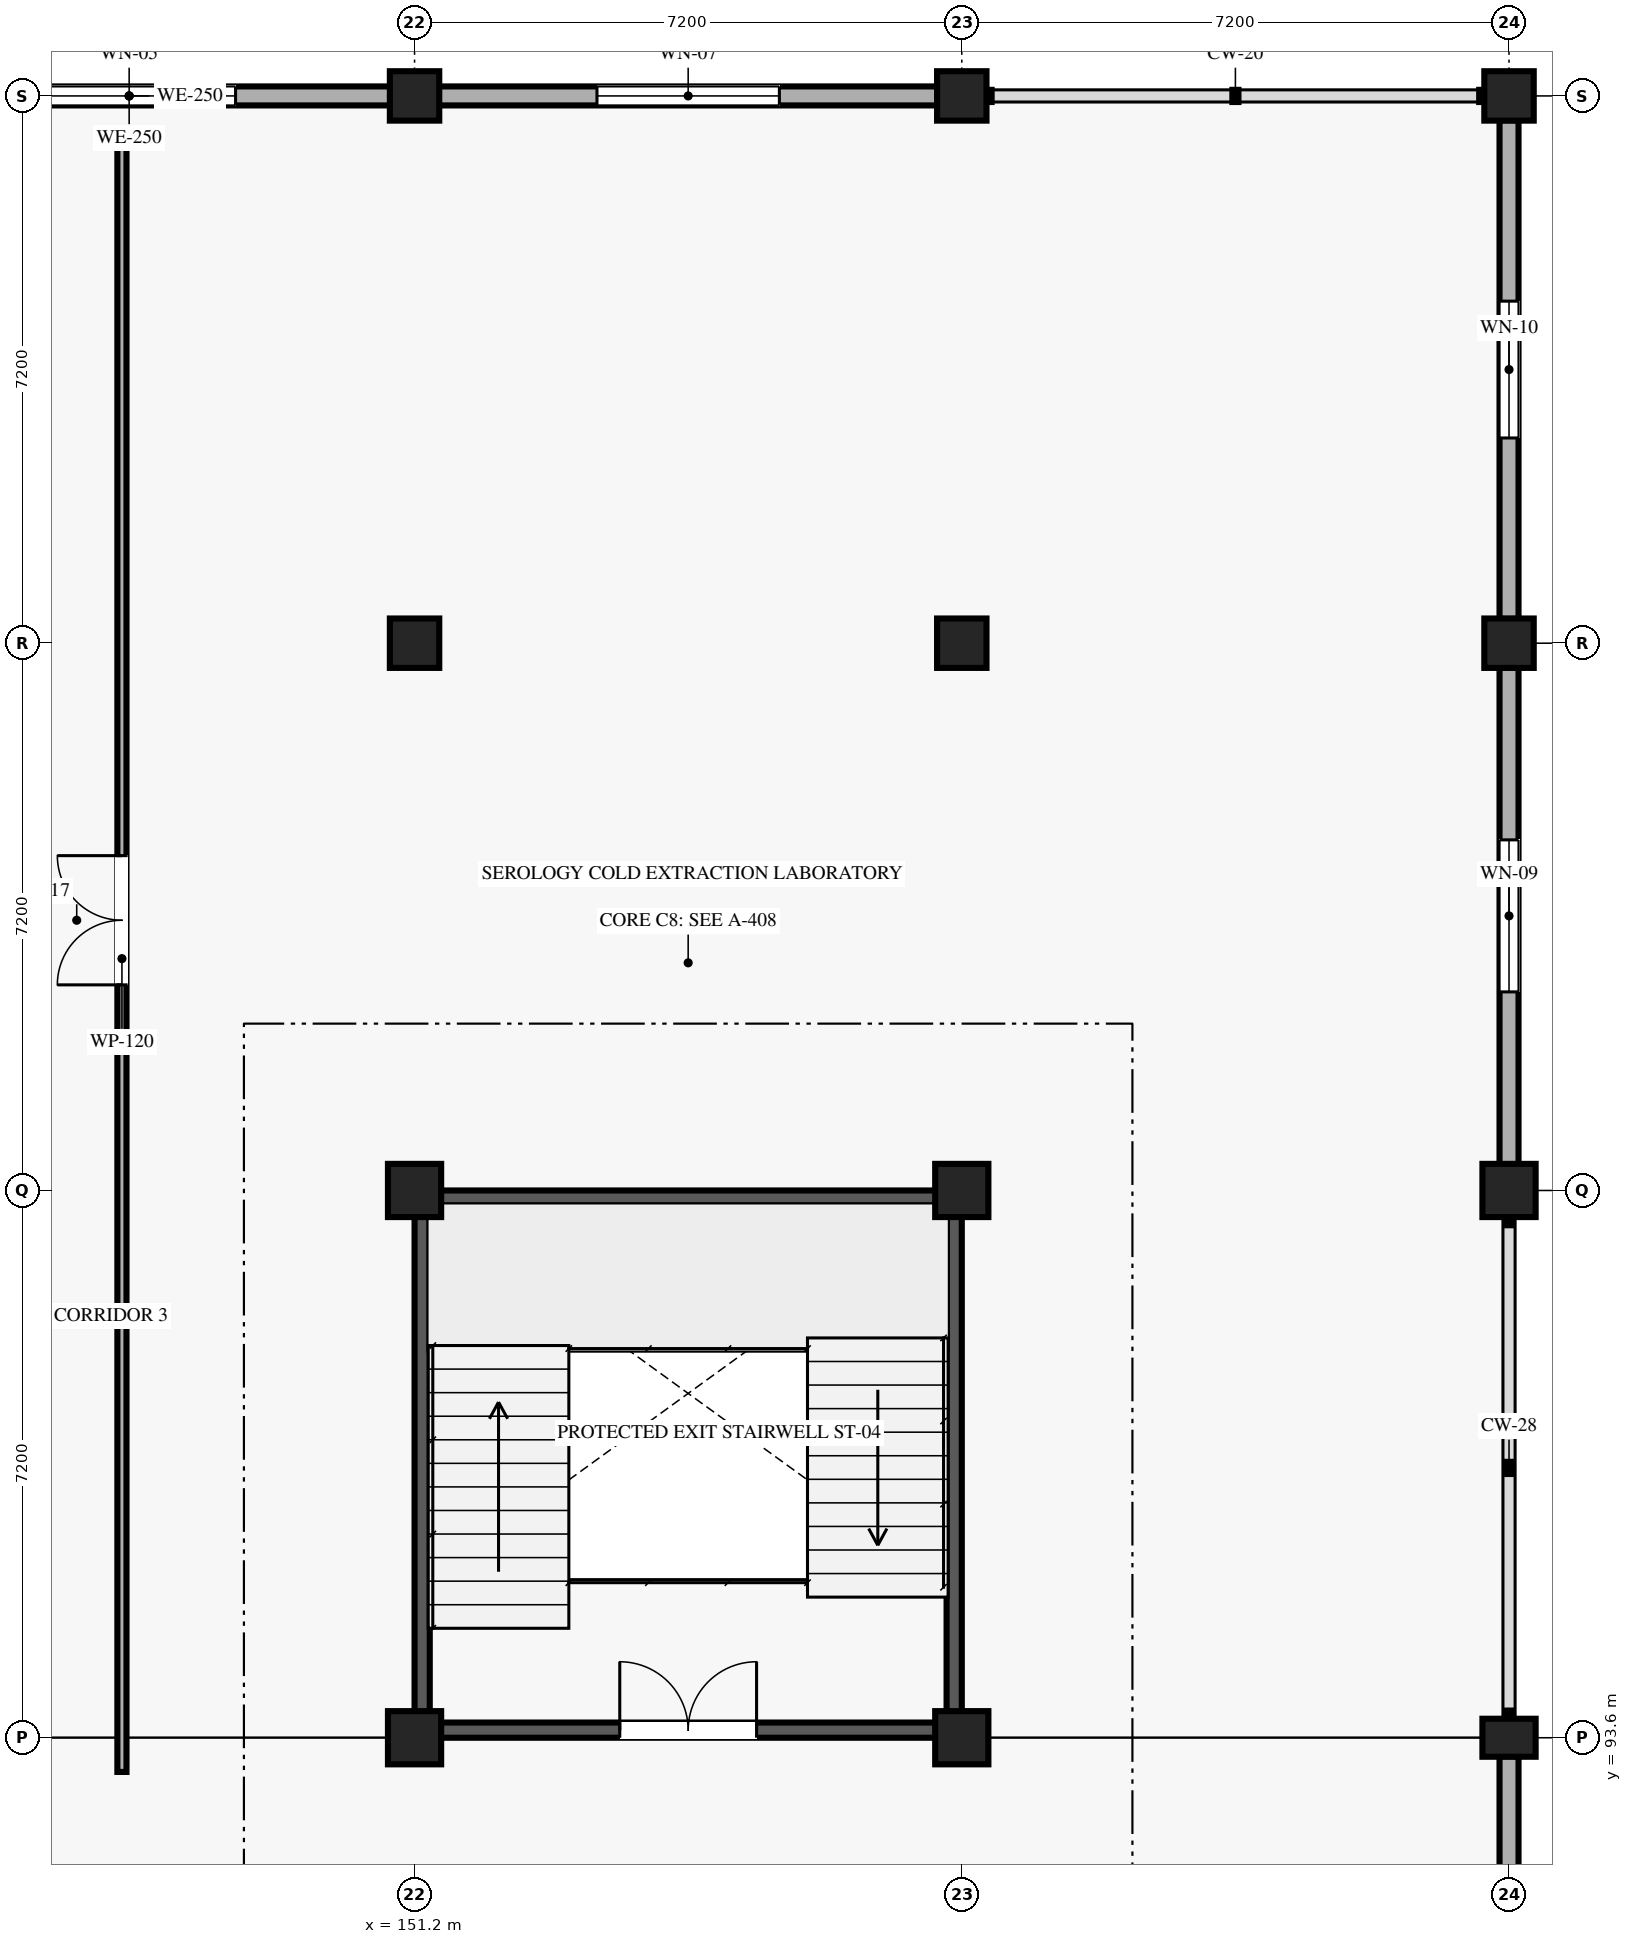
"""IFC4 building model, lengths in metres.
Left out: names, types, materials, properties, quantities, classifications, styles, units other than length and angle.
Written with IfcOpenShell. Run it as: python <this file> out.ifc"""

import sys

from ifc_helpers import new_model, si_unit, direction, frame, frame_2d, origin, origin_2d, place, context, subcontext, project, spatial, rectangle, extrude, element, fill, save


model = new_model("IFC4")
c1 = context("Model", 3, precision=1e-05, world=origin(), true_north=direction((0.0, 1.0)))
c2 = subcontext(c1, "Body", "Model", "MODEL_VIEW")
j1 = project(units=[si_unit("LENGTHUNIT", "METRE"), si_unit("PLANEANGLEUNIT", "RADIAN")], contexts=[c1])
p1 = place(None, origin())
s1 = spatial("IfcSite", under=j1, at=p1, CompositionType="ELEMENT")
p2 = place(p1, origin())
s2 = spatial("IfcBuilding", under=s1, at=p2, CompositionType="ELEMENT")
p3 = place(p2, frame((0.0, 0.0, 13.5)))
s3 = spatial("IfcBuildingStorey", under=s2, at=p3, CompositionType="ELEMENT", Elevation=13.5)
for number, where, z_axis, x_axis in (
    (1, (151.2, 93.6, 0.0), (0.0, 0.0, 1.0), (1.0, 0.0, 0.0)),
    (2, (151.2, 100.8, 0.0), (0.0, 0.0, 1.0), (1.0, 0.0, 0.0)),
):
    element("IfcColumn", number, at=place(p3, frame(where, z_axis=z_axis, x_axis=x_axis)), inside=s3, PredefinedType="COLUMN", context=c2, shape_type="SweptSolid", body=[
        extrude(rectangle(XDim=0.7, YDim=0.7, at=origin_2d()), origin(), (0.0, 0.0, 1.0), 4.05),
    ])
for number, where, z_axis, x_axis in (
    (3, (151.2, 108.0, 0.0), (0.0, 0.0, 1.0), (1.0, 0.0, 0.0)),
    (4, (151.2, 115.2, 0.0), (0.0, 0.0, 1.0), (1.0, 0.0, 0.0)),
):
    element("IfcColumn", number, at=place(p3, frame(where, z_axis=z_axis, x_axis=x_axis)), inside=s3, PredefinedType="COLUMN", context=c2, shape_type="SweptSolid", body=[
        extrude(rectangle(XDim=0.65, YDim=0.65, at=origin_2d()), origin(), (0.0, 0.0, 1.0), 4.05),
    ])
for number, where, z_axis, x_axis in (
    (5, (158.4, 93.6, 0.0), (0.0, 0.0, 1.0), (1.0, 0.0, 0.0)),
    (6, (158.4, 100.8, 0.0), (0.0, 0.0, 1.0), (1.0, 0.0, 0.0)),
):
    element("IfcColumn", number, at=place(p3, frame(where, z_axis=z_axis, x_axis=x_axis)), inside=s3, PredefinedType="COLUMN", context=c2, shape_type="SweptSolid", body=[
        extrude(rectangle(XDim=0.7, YDim=0.7, at=origin_2d()), origin(), (0.0, 0.0, 1.0), 4.05),
    ])
for number, where, z_axis, x_axis in (
    (7, (158.4, 108.0, 0.0), (0.0, 0.0, 1.0), (1.0, 0.0, 0.0)),
    (8, (158.4, 115.2, 0.0), (0.0, 0.0, 1.0), (1.0, 0.0, 0.0)),
):
    element("IfcColumn", number, at=place(p3, frame(where, z_axis=z_axis, x_axis=x_axis)), inside=s3, PredefinedType="COLUMN", context=c2, shape_type="SweptSolid", body=[
        extrude(rectangle(XDim=0.65, YDim=0.65, at=origin_2d()), origin(), (0.0, 0.0, 1.0), 4.05),
    ])
p4 = place(p3, frame((165.6, 93.6, 0.0), z_axis=(0.0, 0.0, 1.0), x_axis=(0.0, 1.0, 0.0)))
e9 = element("IfcColumn", 9, at=p4, inside=s3, PredefinedType="COLUMN", context=c2, shape_type="SweptSolid", body=[
    extrude(rectangle(XDim=0.5, YDim=0.7, at=origin_2d()), origin(), (0.0, 0.0, 1.0), 4.05),
])
p5 = place(p3, frame((165.6, 100.8, 0.0), z_axis=(0.0, 0.0, 1.0), x_axis=(1.0, 0.0, 0.0)))
e10 = element("IfcColumn", 10, at=p5, inside=s3, PredefinedType="COLUMN", context=c2, shape_type="SweptSolid", body=[
    extrude(rectangle(XDim=0.7, YDim=0.7, at=origin_2d()), origin(), (0.0, 0.0, 1.0), 4.05),
])
for number, where, z_axis, x_axis in (
    (11, (165.6, 108.0, 0.0), (0.0, 0.0, 1.0), (1.0, 0.0, 0.0)),
    (12, (165.6, 115.2, 0.0), (0.0, 0.0, 1.0), (1.0, 0.0, 0.0)),
):
    element("IfcColumn", number, at=place(p3, frame(where, z_axis=z_axis, x_axis=x_axis)), inside=s3, PredefinedType="COLUMN", context=c2, shape_type="SweptSolid", body=[
        extrude(rectangle(XDim=0.65, YDim=0.65, at=origin_2d()), origin(), (0.0, 0.0, 1.0), 4.05),
    ])
p6 = place(p3, frame((144.01, 115.2, 0.0), z_axis=(0.0, 0.0, 1.0), x_axis=(1.0, 0.0, 0.0)))
e13 = element("IfcWall", 13, at=p6, inside=s3, PredefinedType="SOLIDWALL", context=c2, shape_type="SweptSolid", body=[
    extrude(rectangle(XDim=6.87, YDim=0.25, at=frame_2d((3.435, 0.0))), origin(), (0.0, 0.0, 1.0), 3.195),
])
p7 = place(p6, frame((2.035, 0.0, 0.85)))
e14 = element("IfcOpeningElement", 14, at=p7, cuts=e13, PredefinedType="OPENING", context=c2, shape_type="SweptSolid", body=[
    extrude(rectangle(XDim=2.8, YDim=1.85, at=frame_2d((1.4, 0.925))), frame((0.0, 0.135, 0.0), z_axis=(0.0, -1.0, 0.0), x_axis=(1.0, 0.0, 0.0)), (0.0, 0.0, 1.0), 0.27),
])
p8 = place(p3, frame((151.52, 115.2, 0.0), z_axis=(0.0, 0.0, 1.0), x_axis=(1.0, 0.0, 0.0)))
e15 = element("IfcWall", 15, at=p8, inside=s3, PredefinedType="SOLIDWALL", context=c2, shape_type="SweptSolid", body=[
    extrude(rectangle(XDim=6.56, YDim=0.25, at=frame_2d((3.28, 0.0))), origin(), (0.0, 0.0, 1.0), 3.195),
])
p9 = place(p8, frame((2.08, 0.0, 0.85)))
e16 = element("IfcOpeningElement", 16, at=p9, cuts=e15, PredefinedType="OPENING", context=c2, shape_type="SweptSolid", body=[
    extrude(rectangle(XDim=2.4, YDim=1.75, at=frame_2d((1.2, 0.875))), frame((0.0, 0.135, 0.0), z_axis=(0.0, -1.0, 0.0), x_axis=(1.0, 0.0, 0.0)), (0.0, 0.0, 1.0), 0.27),
])
p10 = place(p3, frame((165.6, 86.645, 0.0), z_axis=(0.0, 0.0, 1.0), x_axis=(0.0, 1.0, 0.0)))
e17 = element("IfcWall", 17, at=p10, inside=s3, PredefinedType="SOLIDWALL", context=c2, shape_type="SweptSolid", body=[
    extrude(rectangle(XDim=6.71, YDim=0.25, at=frame_2d((3.355, 0.0))), origin(), (0.0, 0.0, 1.0), 3.195),
])
p11 = place(p10, frame((2.155, 0.0, 0.85)))
e18 = element("IfcOpeningElement", 18, at=p11, cuts=e17, PredefinedType="OPENING", context=c2, shape_type="SweptSolid", body=[
    extrude(rectangle(XDim=2.4, YDim=1.75, at=frame_2d((1.2, 0.875))), frame((0.0, 0.135, 0.0), z_axis=(0.0, -1.0, 0.0), x_axis=(1.0, 0.0, 0.0)), (0.0, 0.0, 1.0), 0.27),
])
p12 = place(p3, frame((165.6, 101.145, 0.0), z_axis=(0.0, 0.0, 1.0), x_axis=(0.0, 1.0, 0.0)))
e19 = element("IfcWall", 19, at=p12, inside=s3, PredefinedType="SOLIDWALL", context=c2, shape_type="SweptSolid", body=[
    extrude(rectangle(XDim=6.535, YDim=0.25, at=frame_2d((3.268, 0.0))), origin(), (0.0, 0.0, 1.0), 3.195),
])
p13 = place(p12, frame((2.268, 0.0, 0.85)))
e20 = element("IfcOpeningElement", 20, at=p13, cuts=e19, PredefinedType="OPENING", context=c2, shape_type="SweptSolid", body=[
    extrude(rectangle(XDim=2.0, YDim=1.65, at=frame_2d((1.0, 0.825))), frame((0.0, 0.135, 0.0), z_axis=(0.0, -1.0, 0.0), x_axis=(1.0, 0.0, 0.0)), (0.0, 0.0, 1.0), 0.27),
])
p14 = place(p3, frame((165.6, 108.32, 0.0), z_axis=(0.0, 0.0, 1.0), x_axis=(0.0, 1.0, 0.0)))
e21 = element("IfcWall", 21, at=p14, inside=s3, PredefinedType="SOLIDWALL", context=c2, shape_type="SweptSolid", body=[
    extrude(rectangle(XDim=6.56, YDim=0.25, at=frame_2d((3.28, 0.0))), origin(), (0.0, 0.0, 1.0), 3.195),
])
p15 = place(p14, frame((2.38, 0.0, 0.85)))
e22 = element("IfcOpeningElement", 22, at=p15, cuts=e21, PredefinedType="OPENING", context=c2, shape_type="SweptSolid", body=[
    extrude(rectangle(XDim=1.8, YDim=1.6, at=frame_2d((0.9, 0.8))), frame((0.0, 0.135, 0.0), z_axis=(0.0, -1.0, 0.0), x_axis=(1.0, 0.0, 0.0)), (0.0, 0.0, 1.0), 0.27),
])
p16 = place(p3, frame((151.4, 93.7, 0.0), z_axis=(0.0, 0.0, 1.0), x_axis=(1.0, 0.0, 0.0)))
e23 = element("IfcWall", 23, at=p16, inside=s3, PredefinedType="SHEAR", context=c2, shape_type="SweptSolid", body=[
    extrude(rectangle(XDim=6.8, YDim=0.2, at=frame_2d((3.4, 0.0))), origin(), (0.0, 0.0, 1.0), 3.81),
])
p17 = place(p16, frame((2.5, 0.0, 0.0)))
e24 = element("IfcOpeningElement", 24, at=p17, cuts=e23, PredefinedType="OPENING", context=c2, shape_type="SweptSolid", body=[
    extrude(rectangle(XDim=1.8, YDim=2.2, at=frame_2d((0.9, 1.1))), frame((0.0, 0.11, 0.0), z_axis=(0.0, -1.0, 0.0), x_axis=(1.0, 0.0, 0.0)), (0.0, 0.0, 1.0), 0.22),
])
for number, where, z_axis, x_axis in (
    (25, (151.4, 100.7, 0.0), (0.0, 0.0, 1.0), (1.0, 0.0, 0.0)),
    (26, (151.3, 93.8, 0.0), (0.0, 0.0, 1.0), (0.0, 1.0, 0.0)),
    (27, (158.3, 93.8, 0.0), (0.0, 0.0, 1.0), (0.0, 1.0, 0.0)),
):
    element("IfcWall", number, at=place(p3, frame(where, z_axis=z_axis, x_axis=x_axis)), inside=s3, PredefinedType="SHEAR", context=c2, shape_type="SweptSolid", body=[
        extrude(rectangle(XDim=6.8, YDim=0.2, at=frame_2d((3.4, 0.0))), origin(), (0.0, 0.0, 1.0), 3.81),
    ])
p18 = place(p3, frame((147.35, 93.15, 0.0), z_axis=(0.0, 0.0, 1.0), x_axis=(0.0, 1.0, 0.0)))
e28 = element("IfcWall", 28, at=p18, inside=s3, PredefinedType="PARTITIONING", context=c2, shape_type="SweptSolid", body=[
    extrude(rectangle(XDim=21.4, YDim=0.12, at=frame_2d((10.7, 0.0))), origin(), (0.0, 0.0, 1.0), 3.81),
])
p19 = place(p18, frame((10.355, 0.0, 0.0)))
e29 = element("IfcOpeningElement", 29, at=p19, cuts=e28, PredefinedType="OPENING", context=c2, shape_type="SweptSolid", body=[
    extrude(rectangle(XDim=1.7, YDim=2.2, at=frame_2d((0.85, 1.1))), frame((0.0, 0.07, 0.0), z_axis=(0.0, -1.0, 0.0), x_axis=(1.0, 0.0, 0.0)), (0.0, 0.0, 1.0), 0.14),
])
p20 = place(p7, origin())
e30 = element("IfcWindow", 30, at=p20, inside=s3, PartitioningType="SINGLE_PANEL", PredefinedType="WINDOW", context=c2, shape_type="SweptSolid", body=[
    extrude(rectangle(XDim=2.8, YDim=1.85, at=frame_2d((1.4, 0.925))), frame((0.0, 0.03, 0.0), z_axis=(0.0, -1.0, 0.0), x_axis=(1.0, 0.0, 0.0)), (0.0, 0.0, 1.0), 0.06),
])
fill(e14, e30)
p21 = place(p9, origin())
e31 = element("IfcWindow", 31, at=p21, inside=s3, PartitioningType="SINGLE_PANEL", PredefinedType="WINDOW", context=c2, shape_type="SweptSolid", body=[
    extrude(rectangle(XDim=2.4, YDim=1.75, at=frame_2d((1.2, 0.875))), frame((0.0, 0.03, 0.0), z_axis=(0.0, -1.0, 0.0), x_axis=(1.0, 0.0, 0.0)), (0.0, 0.0, 1.0), 0.06),
])
fill(e16, e31)
p22 = place(p13, origin())
e32 = element("IfcWindow", 32, at=p22, inside=s3, PartitioningType="SINGLE_PANEL", PredefinedType="WINDOW", context=c2, shape_type="SweptSolid", body=[
    extrude(rectangle(XDim=2.0, YDim=1.65, at=frame_2d((1.0, 0.825))), frame((0.0, 0.03, 0.0), z_axis=(0.0, -1.0, 0.0), x_axis=(1.0, 0.0, 0.0)), (0.0, 0.0, 1.0), 0.06),
])
fill(e20, e32)
p23 = place(p15, origin())
e33 = element("IfcWindow", 33, at=p23, inside=s3, PartitioningType="SINGLE_PANEL", PredefinedType="WINDOW", context=c2, shape_type="SweptSolid", body=[
    extrude(rectangle(XDim=1.8, YDim=1.6, at=frame_2d((0.9, 0.8))), frame((0.0, 0.03, 0.0), z_axis=(0.0, -1.0, 0.0), x_axis=(1.0, 0.0, 0.0)), (0.0, 0.0, 1.0), 0.06),
])
fill(e22, e33)
p24 = place(p17, origin())
e34 = element("IfcDoor", 34, at=p24, inside=s3, OperationType="DOUBLE_DOOR_SINGLE_SWING", PredefinedType="DOOR", context=c2, shape_type="SweptSolid", body=[
    extrude(rectangle(XDim=1.8, YDim=2.2, at=frame_2d((0.9, 1.1))), frame((0.0, 0.025, 0.0), z_axis=(0.0, -1.0, 0.0), x_axis=(1.0, 0.0, 0.0)), (0.0, 0.0, 1.0), 0.05),
])
fill(e24, e34)
p25 = place(p19, origin())
e35 = element("IfcDoor", 35, at=p25, inside=s3, OperationType="DOUBLE_DOOR_SINGLE_SWING", PredefinedType="DOOR", context=c2, shape_type="SweptSolid", body=[
    extrude(rectangle(XDim=1.7, YDim=2.2, at=frame_2d((0.85, 1.1))), frame((0.0, 0.025, 0.0), z_axis=(0.0, -1.0, 0.0), x_axis=(1.0, 0.0, 0.0)), (0.0, 0.0, 1.0), 0.05),
])
fill(e29, e35)
save(model, sys.argv[1])
